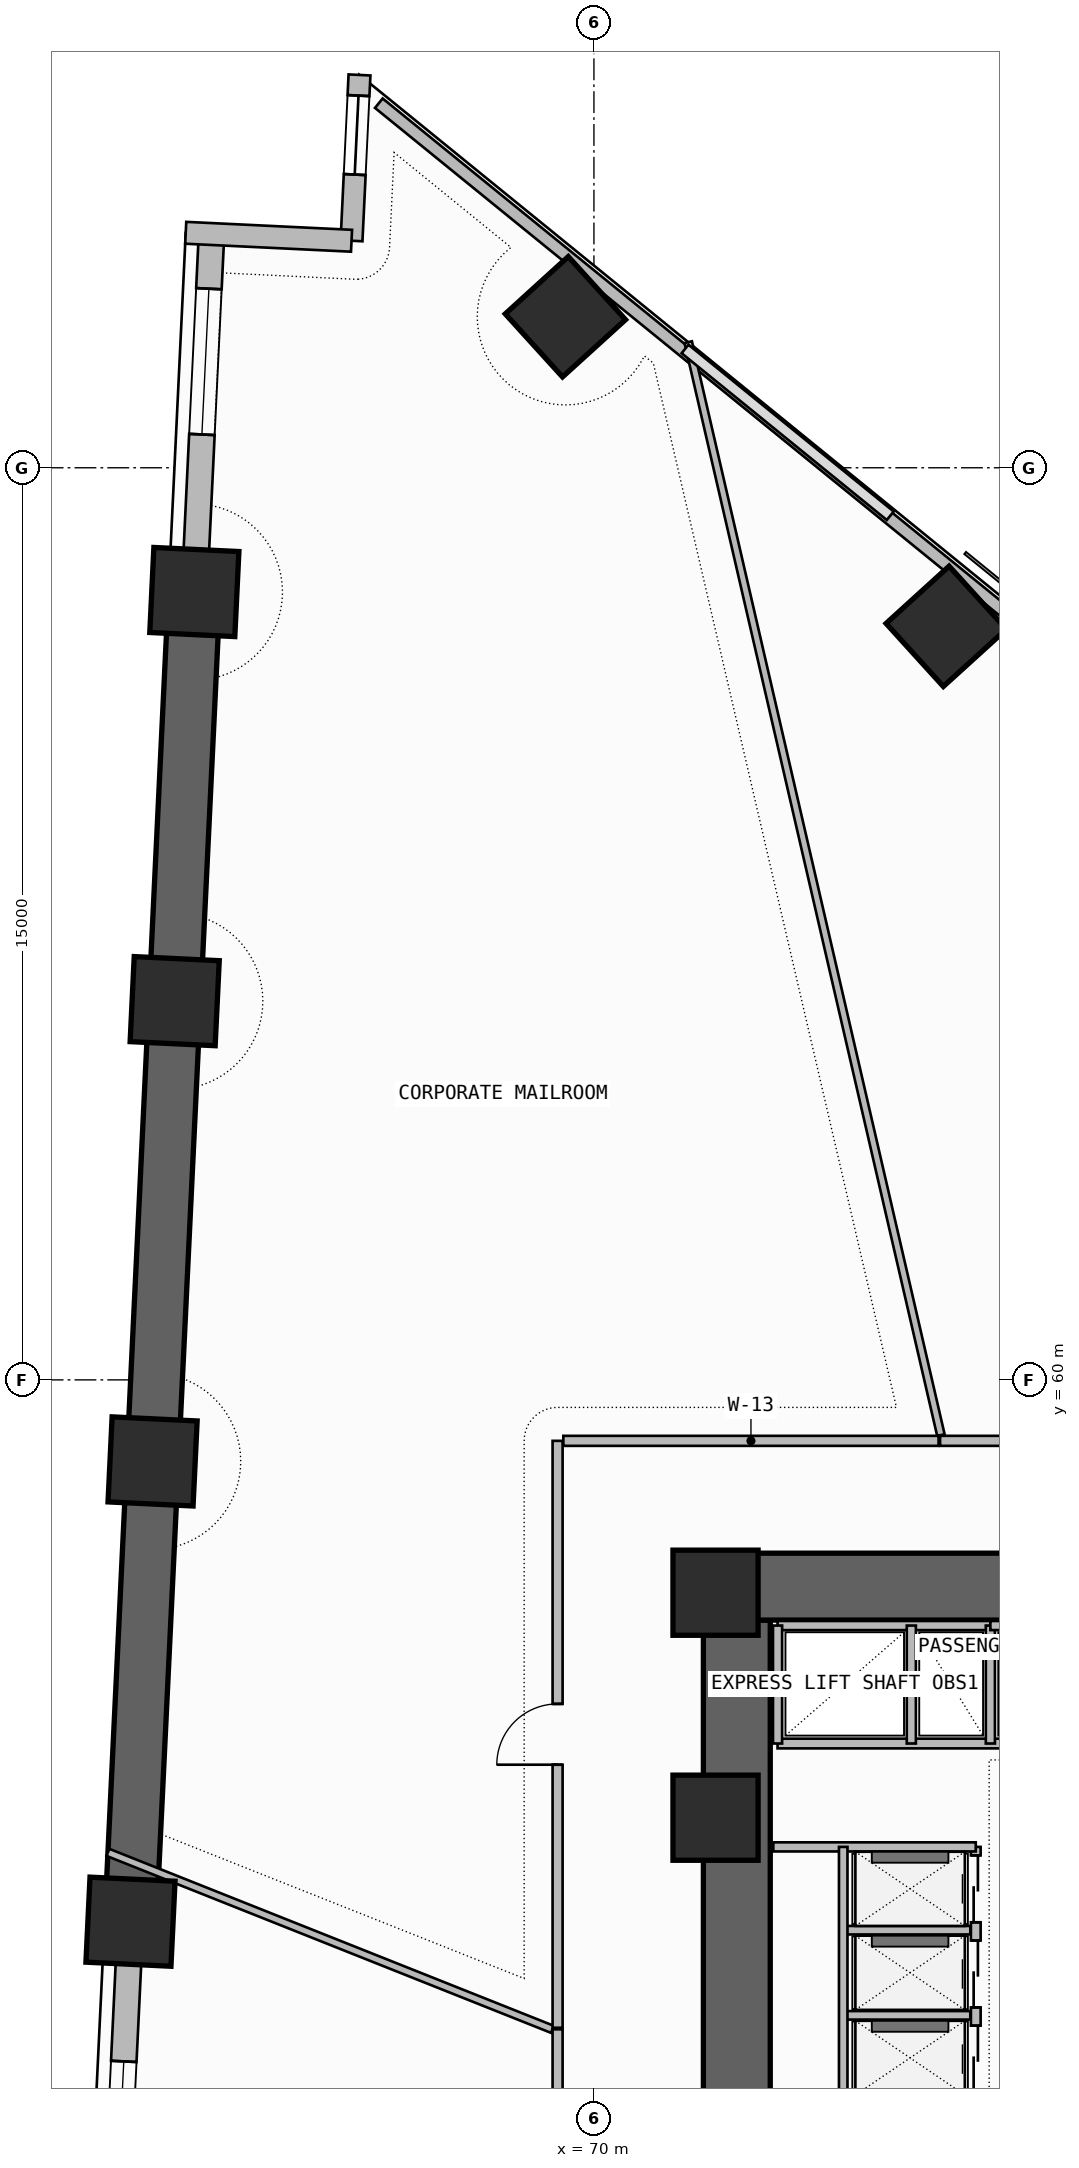
"""IFC4 building model, lengths in metres.
Left out: names, types, materials, properties, quantities, classifications, styles, units other than length and angle.
Written with IfcOpenShell. Run it as: python <this file> out.ifc"""

import sys

from ifc_helpers import new_model, si_unit, direction, frame, frame_2d, origin, origin_2d, place, context, subcontext, project, spatial, rectangle, extrude, element, fill, save


model = new_model("IFC4")
c1 = context("Model", 3, precision=1e-05, world=origin(), true_north=direction((0.0, 1.0)))
c2 = subcontext(c1, "Body", "Model", "MODEL_VIEW")
j1 = project(units=[si_unit("LENGTHUNIT", "METRE"), si_unit("PLANEANGLEUNIT", "RADIAN")], contexts=[c1])
p1 = place(None, origin())
s1 = spatial("IfcSite", under=j1, at=p1, CompositionType="ELEMENT")
p2 = place(p1, origin())
s2 = spatial("IfcBuilding", under=s1, at=p2, CompositionType="ELEMENT")
p3 = place(p2, frame((0.0, 0.0, 51.9)))
s3 = spatial("IfcBuildingStorey", under=s2, at=p3, CompositionType="ELEMENT", Elevation=51.9)
p4 = place(p3, frame((72.35, 43.35, -0.2), z_axis=(0.0, 0.0, 1.0), x_axis=(0.0, 1.0, 0.0)))
e1 = element("IfcWall", 1, at=p4, inside=s3, PredefinedType="SHEAR", context=c2, shape_type="SweptSolid", body=[
    extrude(rectangle(XDim=12.7, YDim=1.1, at=frame_2d((6.35, 0.0))), origin(), (0.0, 0.0, 1.0), 3.6),
])
p5 = place(p4, frame((1.35, 0.0, 0.2)))
e2 = element("IfcOpeningElement", 2, at=p5, cuts=e1, PredefinedType="OPENING", context=c2, shape_type="SweptSolid", body=[
    extrude(rectangle(XDim=1.2, YDim=2.2, at=frame_2d((0.6, 1.1))), frame((0.0, 0.56, 0.0), z_axis=(0.0, -1.0, 0.0), x_axis=(1.0, 0.0, 0.0)), (0.0, 0.0, 1.0), 1.12),
])
p6 = place(p3, frame((71.8, 56.6, -0.2), z_axis=(0.0, 0.0, 1.0), x_axis=(1.0, 0.0, 0.0)))
e3 = element("IfcWall", 3, at=p6, inside=s3, PredefinedType="SHEAR", context=c2, shape_type="SweptSolid", body=[
    extrude(rectangle(XDim=14.3, YDim=1.1, at=frame_2d((7.15, 0.0))), origin(), (0.0, 0.0, 1.0), 3.6),
])
for number, where, z_axis, x_axis in (
    (4, (72.0, 52.8, 0.0), (0.0, 0.0, 1.0), (1.0, 0.0, 0.0)),
    (5, (72.0, 56.5, 0.0), (0.0, 0.0, 1.0), (1.0, 0.0, 0.0)),
    (6, (75.794, 72.392, 0.0), (0.0, 0.0, 1.0), (0.74, 0.672, 0.0)),
    (7, (69.531, 77.483, 0.0), (0.0, 0.0, 1.0), (0.74, 0.672, 0.0)),
    (8, (63.428, 72.957, 0.0), (0.0, 0.0, 1.0), (0.048, 0.999, 0.0)),
    (9, (63.105, 66.228, 0.0), (0.0, 0.0, 1.0), (0.048, 0.999, 0.0)),
    (10, (62.742, 58.659, 0.0), (0.0, 0.0, 1.0), (0.048, 0.999, 0.0)),
    (11, (62.378, 51.09, 0.0), (0.0, 0.0, 1.0), (0.048, 0.999, 0.0)),
):
    element("IfcColumn", number, at=place(p3, frame(where, z_axis=z_axis, x_axis=x_axis)), inside=s3, PredefinedType="COLUMN", context=c2, shape_type="SweptSolid", body=[
        extrude(rectangle(XDim=1.4, YDim=1.4, at=origin_2d()), origin(), (0.0, 0.0, 1.0), 3.6),
    ])
p7 = place(p3, frame((63.711, 78.844, 0.0), z_axis=(0.0, 0.0, 1.0), x_axis=(-0.048007946398, -0.998846953784, 0.0)))
e12 = element("IfcWall", 12, at=p7, inside=s3, PredefinedType="SOLIDWALL", context=c2, shape_type="SweptSolid", body=[
    extrude(rectangle(XDim=5.894, YDim=0.42, at=frame_2d((2.947, 0.0))), origin(), (0.0, 0.0, 1.0), 2.385),
])
p8 = place(p7, frame((0.9, 0.0, 1.2)))
e13 = element("IfcOpeningElement", 13, at=p8, cuts=e12, PredefinedType="OPENING", context=c2, shape_type="SweptSolid", body=[
    extrude(rectangle(XDim=2.4, YDim=0.9, at=frame_2d((1.2, 0.45))), frame((0.0, 0.22, 0.0), z_axis=(0.0, -1.0, 0.0), x_axis=(1.0, 0.0, 0.0)), (0.0, 0.0, 1.0), 0.44),
])
p9 = place(p3, frame((63.428, 72.957, -0.2), z_axis=(0.0, 0.0, 1.0), x_axis=(-0.047976309476, -0.998848473858, 0.0)))
e14 = element("IfcWall", 14, at=p9, inside=s3, PredefinedType="SHEAR", context=c2, shape_type="SweptSolid", body=[
    extrude(rectangle(XDim=21.892, YDim=0.85, at=frame_2d((10.946, 0.0))), origin(), (0.0, 0.0, 1.0), 3.6),
])
p10 = place(p3, frame((62.378, 51.09, 0.0), z_axis=(0.0, 0.0, 1.0), x_axis=(-0.047978424452, -0.99884837227, 0.0)))
e15 = element("IfcWall", 15, at=p10, inside=s3, PredefinedType="SOLIDWALL", context=c2, shape_type="SweptSolid", body=[
    extrude(rectangle(XDim=14.314, YDim=0.42, at=frame_2d((7.157, 0.0))), origin(), (0.0, 0.0, 1.0), 2.385),
])
p11 = place(p10, frame((2.3, 0.0, 1.2)))
e16 = element("IfcOpeningElement", 16, at=p11, cuts=e15, PredefinedType="OPENING", context=c2, shape_type="SweptSolid", body=[
    extrude(rectangle(XDim=2.4, YDim=0.9, at=frame_2d((1.2, 0.45))), frame((0.0, 0.22, 0.0), z_axis=(0.0, -1.0, 0.0), x_axis=(1.0, 0.0, 0.0)), (0.0, 0.0, 1.0), 0.44),
])
p12 = place(p3, frame((66.144, 81.46, 0.0), z_axis=(0.0, 0.0, 1.0), x_axis=(-0.047934806162, -0.998850466465, 0.0)))
e17 = element("IfcWall", 17, at=p12, inside=s3, PredefinedType="SOLIDWALL", context=c2, shape_type="SweptSolid", body=[
    extrude(rectangle(XDim=2.73, YDim=0.36, at=frame_2d((1.365, 0.0))), origin(), (0.0, 0.0, 1.0), 3.4),
])
p13 = place(p12, frame((0.34, 0.0, 0.45)))
e18 = element("IfcOpeningElement", 18, at=p13, cuts=e17, PredefinedType="OPENING", context=c2, shape_type="SweptSolid", body=[
    extrude(rectangle(XDim=1.3, YDim=2.4, at=frame_2d((0.65, 1.2))), frame((0.0, 0.19, 0.0), z_axis=(0.0, -1.0, 0.0), x_axis=(1.0, 0.0, 0.0)), (0.0, 0.0, 1.0), 0.38),
])
p14 = place(p3, frame((66.013, 78.733, 0.0), z_axis=(0.0, 0.0, 1.0), x_axis=(-0.998846180588, 0.048024030708, 0.0)))
e19 = element("IfcWall", 19, at=p14, inside=s3, PredefinedType="SOLIDWALL", context=c2, shape_type="SweptSolid", body=[
    extrude(rectangle(XDim=2.73, YDim=0.36, at=frame_2d((1.365, 0.0))), origin(), (0.0, 0.0, 1.0), 3.4),
])
p15 = place(p3, frame((94.513, 58.196, 0.0), z_axis=(0.0, 0.0, 1.0), x_axis=(-0.776001602097, 0.630730935933, 0.0)))
e20 = element("IfcWall", 20, at=p15, inside=s3, PredefinedType="PARAPET", context=c2, shape_type="SweptSolid", body=[
    extrude(rectangle(XDim=36.148, YDim=0.2, at=frame_2d((18.074, 0.0))), origin(), (0.0, 0.0, 1.0), 1.15),
])
p16 = place(p3, frame((76.28, 47.18, 0.0), z_axis=(0.0, 0.0, 1.0), x_axis=(0.0, 1.0, 0.0)))
e21 = element("IfcWall", 21, at=p16, inside=s3, PredefinedType="SOLIDWALL", context=c2, shape_type="SweptSolid", body=[
    extrude(rectangle(XDim=5.14, YDim=0.16, at=frame_2d((2.57, 0.0))), origin(), (0.0, 0.0, 1.0), 3.4),
])
p17 = place(p16, frame((1.1, 0.0, 0.0)))
e22 = element("IfcOpeningElement", 22, at=p17, cuts=e21, PredefinedType="OPENING", context=c2, shape_type="SweptSolid", body=[
    extrude(rectangle(XDim=1.1, YDim=2.25, at=frame_2d((0.55, 1.125))), frame((0.0, 0.09, 0.0), z_axis=(0.0, -1.0, 0.0), x_axis=(1.0, 0.0, 0.0)), (0.0, 0.0, 1.0), 0.18),
])
p18 = place(p16, frame((2.5, 0.0, 0.0)))
e23 = element("IfcOpeningElement", 23, at=p18, cuts=e21, PredefinedType="OPENING", context=c2, shape_type="SweptSolid", body=[
    extrude(rectangle(XDim=1.1, YDim=2.25, at=frame_2d((0.55, 1.125))), frame((0.0, 0.09, 0.0), z_axis=(0.0, -1.0, 0.0), x_axis=(1.0, 0.0, 0.0)), (0.0, 0.0, 1.0), 0.18),
])
p19 = place(p16, frame((3.9, 0.0, 0.0)))
e24 = element("IfcOpeningElement", 24, at=p19, cuts=e21, PredefinedType="OPENING", context=c2, shape_type="SweptSolid", body=[
    extrude(rectangle(XDim=1.1, YDim=2.25, at=frame_2d((0.55, 1.125))), frame((0.0, 0.09, 0.0), z_axis=(0.0, -1.0, 0.0), x_axis=(1.0, 0.0, 0.0)), (0.0, 0.0, 1.0), 0.18),
])
p20 = place(p16, frame((0.12, 0.0, 0.0)))
e25 = element("IfcOpeningElement", 25, at=p20, cuts=e21, PredefinedType="OPENING", context=c2, shape_type="SweptSolid", body=[
    extrude(rectangle(XDim=0.85, YDim=2.05, at=frame_2d((0.425, 1.025))), frame((0.0, 0.09, 0.0), z_axis=(0.0, -1.0, 0.0), x_axis=(1.0, 0.0, 0.0)), (0.0, 0.0, 1.0), 0.18),
])
p21 = place(p3, frame((72.95, 52.32, 0.0), z_axis=(0.0, 0.0, 1.0), x_axis=(1.0, 0.0, 0.0)))
e26 = element("IfcWall", 26, at=p21, inside=s3, PredefinedType="SOLIDWALL", context=c2, shape_type="SweptSolid", body=[
    extrude(rectangle(XDim=3.33, YDim=0.15, at=frame_2d((1.665, 0.0))), origin(), (0.0, 0.0, 1.0), 3.4),
])
for number, where, z_axis, x_axis in (
    (27, (74.15, 49.55, 0.0), (0.0, 0.0, 1.0), (1.0, 0.0, 0.0)),
    (28, (74.15, 50.95, 0.0), (0.0, 0.0, 1.0), (1.0, 0.0, 0.0)),
):
    element("IfcWall", number, at=place(p3, frame(where, z_axis=z_axis, x_axis=x_axis)), inside=s3, PredefinedType="PLUMBINGWALL", context=c2, shape_type="SweptSolid", body=[
        extrude(rectangle(XDim=2.04, YDim=0.14, at=frame_2d((1.02, 0.0))), origin(), (0.0, 0.0, 1.0), 3.4),
    ])
p22 = place(p3, frame((74.1, 48.16, 0.0), z_axis=(0.0, 0.0, 1.0), x_axis=(0.0, 1.0, 0.0)))
e29 = element("IfcWall", 29, at=p22, inside=s3, PredefinedType="PLUMBINGWALL", context=c2, shape_type="SweptSolid", body=[
    extrude(rectangle(XDim=4.16, YDim=0.14, at=frame_2d((2.08, 0.0))), origin(), (0.0, 0.0, 1.0), 3.4),
])
p23 = place(p3, frame((73.02, 54.02, 0.0), z_axis=(0.0, 0.0, 1.0), x_axis=(1.0, 0.0, 0.0)))
e30 = element("IfcWall", 30, at=p23, inside=s3, PredefinedType="SOLIDWALL", context=c2, shape_type="SweptSolid", body=[
    extrude(rectangle(XDim=12.08, YDim=0.16, at=frame_2d((6.04, 0.0))), origin(), (0.0, 0.0, 1.0), 3.4),
])
p24 = place(p3, frame((73.02, 55.96, 0.0), z_axis=(0.0, 0.0, 1.0), x_axis=(1.0, 0.0, 0.0)))
e31 = element("IfcWall", 31, at=p24, inside=s3, PredefinedType="SOLIDWALL", context=c2, shape_type="SweptSolid", body=[
    extrude(rectangle(XDim=3.5, YDim=0.15, at=frame_2d((1.75, 0.0))), origin(), (0.0, 0.0, 1.0), 3.4),
])
p25 = place(p3, frame((73.02, 54.02, 0.0), z_axis=(0.0, 0.0, 1.0), x_axis=(0.0, 1.0, 0.0)))
e32 = element("IfcWall", 32, at=p25, inside=s3, PredefinedType="PLUMBINGWALL", context=c2, shape_type="SweptSolid", body=[
    extrude(rectangle(XDim=1.94, YDim=0.15, at=frame_2d((0.97, 0.0))), origin(), (0.0, 0.0, 1.0), 3.4),
])
p26 = place(p3, frame((76.52, 54.02, 0.0), z_axis=(0.0, 0.0, 1.0), x_axis=(0.0, 1.0, 0.0)))
e33 = element("IfcWall", 33, at=p26, inside=s3, PredefinedType="SOLIDWALL", context=c2, shape_type="SweptSolid", body=[
    extrude(rectangle(XDim=1.94, YDim=0.15, at=frame_2d((0.97, 0.0))), origin(), (0.0, 0.0, 1.0), 3.4),
])
p27 = place(p3, frame((75.22, 54.02, 0.0), z_axis=(0.0, 0.0, 1.0), x_axis=(0.0, 1.0, 0.0)))
e34 = element("IfcWall", 34, at=p27, inside=s3, PredefinedType="PLUMBINGWALL", context=c2, shape_type="SweptSolid", body=[
    extrude(rectangle(XDim=1.94, YDim=0.15, at=frame_2d((0.97, 0.0))), origin(), (0.0, 0.0, 1.0), 3.4),
])
p28 = place(p3, frame((76.52, 55.96, 0.0), z_axis=(0.0, 0.0, 1.0), x_axis=(1.0, 0.0, 0.0)))
e35 = element("IfcWall", 35, at=p28, inside=s3, PredefinedType="SOLIDWALL", context=c2, shape_type="SweptSolid", body=[
    extrude(rectangle(XDim=6.7, YDim=0.15, at=frame_2d((3.35, 0.0))), origin(), (0.0, 0.0, 1.0), 3.4),
])
p29 = place(p3, frame((69.403, 49.32, 0.0), z_axis=(0.0, 0.0, 1.0), x_axis=(0.0, -1.0, 0.0)))
e36 = element("IfcWall", 36, at=p29, inside=s3, PredefinedType="PARTITIONING", context=c2, shape_type="SweptSolid", body=[
    extrude(rectangle(XDim=4.958, YDim=0.165, at=frame_2d((2.479, 0.0))), origin(), (0.0, 0.0, 1.0), 3.4),
])
p30 = place(p29, frame((1.979, 0.0, 0.0)))
e37 = element("IfcOpeningElement", 37, at=p30, cuts=e36, PredefinedType="OPENING", context=c2, shape_type="SweptSolid", body=[
    extrude(rectangle(XDim=1.0, YDim=2.2, at=frame_2d((0.5, 1.1))), frame((0.0, 0.093, 0.0), z_axis=(0.0, -1.0, 0.0), x_axis=(1.0, 0.0, 0.0)), (0.0, 0.0, 1.0), 0.185),
])
p31 = place(p3, frame((62.007, 52.23, 0.0), z_axis=(0.0, 0.0, 1.0), x_axis=(0.929100277446, -0.36982789842, 0.0)))
e38 = element("IfcWall", 38, at=p31, inside=s3, PredefinedType="PARTITIONING", context=c2, shape_type="SweptSolid", body=[
    extrude(rectangle(XDim=7.868, YDim=0.125, at=frame_2d((3.934, 0.0))), origin(), (0.0, 0.0, 1.0), 2.385),
])
p32 = place(p3, frame((88.209, 58.998, 0.0), z_axis=(0.0, 0.0, 1.0), x_axis=(-1.0, 0.0, 0.0)))
e39 = element("IfcWall", 39, at=p32, inside=s3, PredefinedType="PARTITIONING", context=c2, shape_type="SweptSolid", body=[
    extrude(rectangle(XDim=12.517, YDim=0.165, at=frame_2d((6.258, 0.0))), origin(), (0.0, 0.0, 1.0), 2.785),
])
p33 = place(p32, frame((5.758, 0.0, 0.0)))
e40 = element("IfcOpeningElement", 40, at=p33, cuts=e39, PredefinedType="OPENING", context=c2, shape_type="SweptSolid", body=[
    extrude(rectangle(XDim=1.0, YDim=2.2, at=frame_2d((0.5, 1.1))), frame((0.0, 0.093, 0.0), z_axis=(0.0, -1.0, 0.0), x_axis=(1.0, 0.0, 0.0)), (0.0, 0.0, 1.0), 0.185),
])
p34 = place(p3, frame((75.706, 59.092, 0.0), z_axis=(0.0, 0.0, 1.0), x_axis=(-0.225258668812, 0.97429899524, 0.0)))
e41 = element("IfcWall", 41, at=p34, inside=s3, PredefinedType="PARTITIONING", context=c2, shape_type="SweptSolid", body=[
    extrude(rectangle(XDim=18.448, YDim=0.125, at=frame_2d((9.224, 0.0))), origin(), (0.0, 0.0, 1.0), 2.785),
])
p35 = place(p3, frame((69.403, 58.998, 0.0), z_axis=(0.0, 0.0, 1.0), x_axis=(0.0, -1.0, 0.0)))
e42 = element("IfcWall", 42, at=p35, inside=s3, PredefinedType="PARTITIONING", context=c2, shape_type="SweptSolid", body=[
    extrude(rectangle(XDim=9.652, YDim=0.165, at=frame_2d((4.826, 0.0))), origin(), (0.0, 0.0, 1.0), 2.785),
])
p36 = place(p35, frame((4.326, 0.0, 0.0)))
e43 = element("IfcOpeningElement", 43, at=p36, cuts=e42, PredefinedType="OPENING", context=c2, shape_type="SweptSolid", body=[
    extrude(rectangle(XDim=1.0, YDim=2.2, at=frame_2d((0.5, 1.1))), frame((0.0, 0.093, 0.0), z_axis=(0.0, -1.0, 0.0), x_axis=(1.0, 0.0, 0.0)), (0.0, 0.0, 1.0), 0.185),
])
p37 = place(p3, frame((75.668, 58.998, 0.0), z_axis=(0.0, 0.0, 1.0), x_axis=(-1.0, 0.0, 0.0)))
e44 = element("IfcWall", 44, at=p37, inside=s3, PredefinedType="PARTITIONING", context=c2, shape_type="SweptSolid", body=[
    extrude(rectangle(XDim=6.171, YDim=0.165, at=frame_2d((3.085, 0.0))), origin(), (0.0, 0.0, 1.0), 2.785),
])
p38 = place(p8, origin())
e45 = element("IfcWindow", 45, at=p38, inside=s3, PartitioningType="SINGLE_PANEL", PredefinedType="WINDOW", context=c2, shape_type="SweptSolid", body=[
    extrude(rectangle(XDim=2.4, YDim=0.9, at=frame_2d((1.2, 0.45))), frame((0.0, 0.03, 0.0), z_axis=(0.0, -1.0, 0.0), x_axis=(1.0, 0.0, 0.0)), (0.0, 0.0, 1.0), 0.06),
])
fill(e13, e45)
p39 = place(p11, origin())
e46 = element("IfcWindow", 46, at=p39, inside=s3, PartitioningType="SINGLE_PANEL", PredefinedType="WINDOW", context=c2, shape_type="SweptSolid", body=[
    extrude(rectangle(XDim=2.4, YDim=0.9, at=frame_2d((1.2, 0.45))), frame((0.0, 0.03, 0.0), z_axis=(0.0, -1.0, 0.0), x_axis=(1.0, 0.0, 0.0)), (0.0, 0.0, 1.0), 0.06),
])
fill(e16, e46)
p40 = place(p13, origin())
e47 = element("IfcWindow", 47, at=p40, inside=s3, PartitioningType="SINGLE_PANEL", PredefinedType="WINDOW", context=c2, shape_type="SweptSolid", body=[
    extrude(rectangle(XDim=1.3, YDim=2.4, at=frame_2d((0.65, 1.2))), frame((0.0, 0.03, 0.0), z_axis=(0.0, -1.0, 0.0), x_axis=(1.0, 0.0, 0.0)), (0.0, 0.0, 1.0), 0.06),
])
fill(e18, e47)
p41 = place(p17, origin())
e48 = element("IfcDoor", 48, at=p41, inside=s3, OperationType="DOUBLE_DOOR_SLIDING", PredefinedType="DOOR", context=c2, shape_type="SweptSolid", body=[
    extrude(rectangle(XDim=1.1, YDim=2.25, at=frame_2d((0.55, 1.125))), frame((0.0, 0.025, 0.0), z_axis=(0.0, -1.0, 0.0), x_axis=(1.0, 0.0, 0.0)), (0.0, 0.0, 1.0), 0.05),
])
fill(e22, e48)
p42 = place(p18, origin())
e49 = element("IfcDoor", 49, at=p42, inside=s3, OperationType="DOUBLE_DOOR_SLIDING", PredefinedType="DOOR", context=c2, shape_type="SweptSolid", body=[
    extrude(rectangle(XDim=1.1, YDim=2.25, at=frame_2d((0.55, 1.125))), frame((0.0, 0.025, 0.0), z_axis=(0.0, -1.0, 0.0), x_axis=(1.0, 0.0, 0.0)), (0.0, 0.0, 1.0), 0.05),
])
fill(e23, e49)
p43 = place(p19, origin())
e50 = element("IfcDoor", 50, at=p43, inside=s3, OperationType="DOUBLE_DOOR_SLIDING", PredefinedType="DOOR", context=c2, shape_type="SweptSolid", body=[
    extrude(rectangle(XDim=1.1, YDim=2.25, at=frame_2d((0.55, 1.125))), frame((0.0, 0.025, 0.0), z_axis=(0.0, -1.0, 0.0), x_axis=(1.0, 0.0, 0.0)), (0.0, 0.0, 1.0), 0.05),
])
fill(e24, e50)
p44 = place(p36, frame((1.0, 0.0, 0.0), z_axis=(0.0, 0.0, 1.0), x_axis=(-1.0, 0.0, 0.0)))
e51 = element("IfcDoor", 51, at=p44, inside=s3, OperationType="SINGLE_SWING_LEFT", PredefinedType="DOOR", context=c2, shape_type="SweptSolid", body=[
    extrude(rectangle(XDim=1.0, YDim=2.2, at=frame_2d((0.5, 1.1))), frame((0.0, 0.025, 0.0), z_axis=(0.0, -1.0, 0.0), x_axis=(1.0, 0.0, 0.0)), (0.0, 0.0, 1.0), 0.05),
])
fill(e43, e51)
save(model, sys.argv[1])
